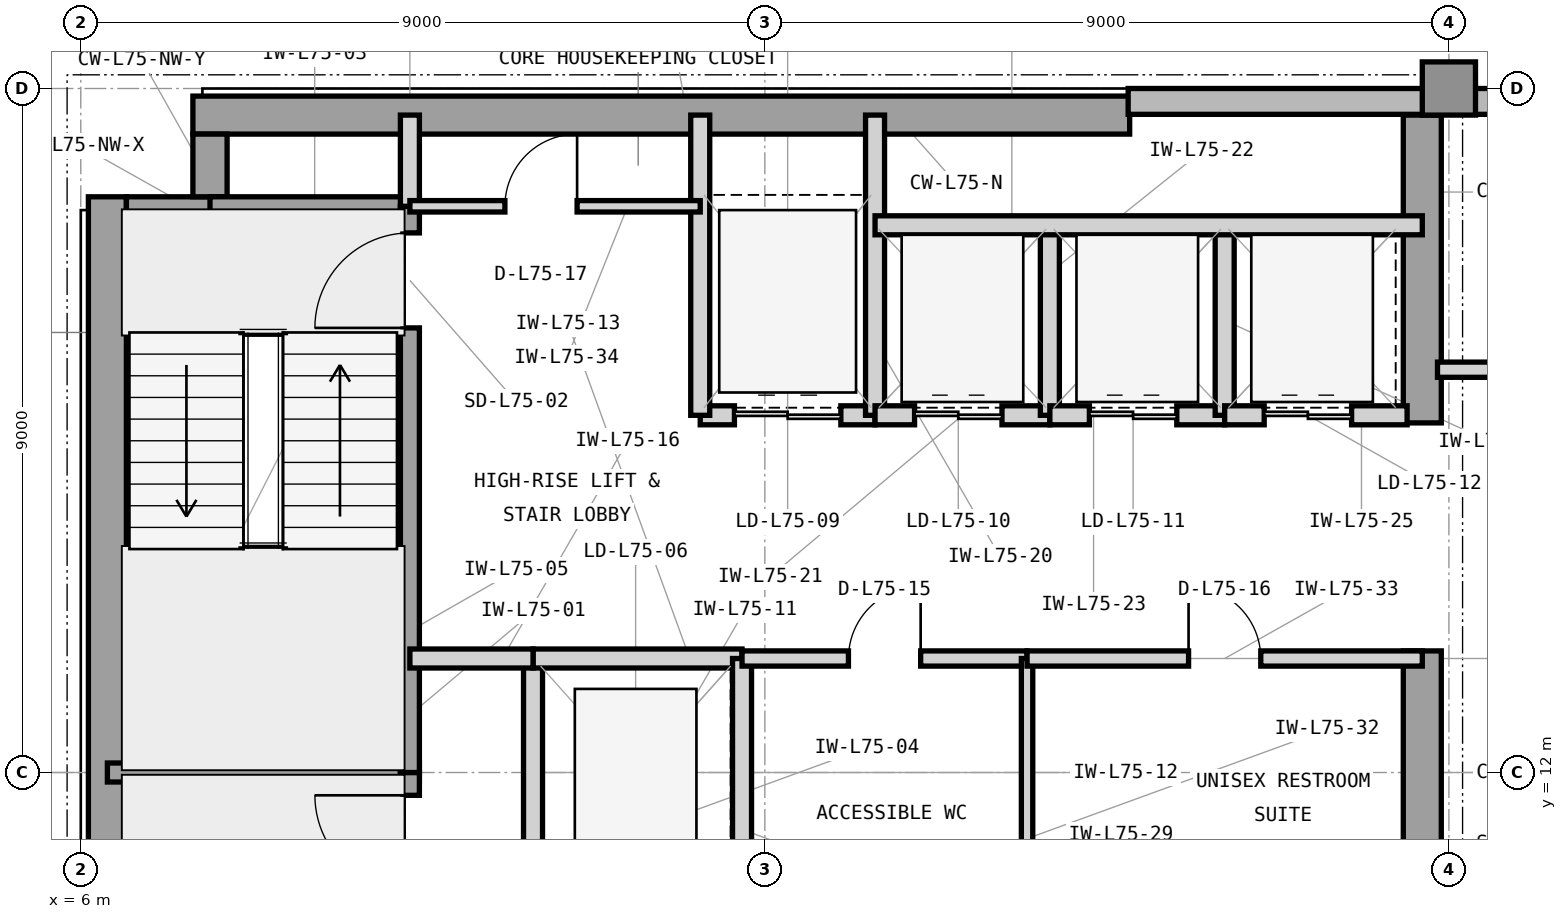
"""IFC4 building model, lengths in metres.
Left out: names, types, materials, properties, quantities, classifications, styles, units other than length and angle.
Written with IfcOpenShell. Run it as: python <this file> out.ifc"""

import sys

from ifc_helpers import new_model, si_unit, direction, frame, frame_2d, origin, origin_2d, place, context, subcontext, project, spatial, rectangle, extrude, element, fill, save


model = new_model("IFC4")
c1 = context("Model", 3, precision=1e-05, world=origin(), true_north=direction((0.0, 1.0)))
c2 = subcontext(c1, "Body", "Model", "MODEL_VIEW")
j1 = project(units=[si_unit("LENGTHUNIT", "METRE"), si_unit("PLANEANGLEUNIT", "RADIAN")], contexts=[c1])
p1 = place(None, origin())
s1 = spatial("IfcSite", under=j1, at=p1, CompositionType="ELEMENT")
p2 = place(p1, origin())
s2 = spatial("IfcBuilding", under=s1, at=p2, CompositionType="ELEMENT")
p3 = place(p2, frame((0.0, 0.0, 305.4)))
s3 = spatial("IfcBuildingStorey", under=s2, at=p3, CompositionType="ELEMENT", Elevation=305.4)
p4 = place(p3, frame((6.35, 4.425, 0.0), z_axis=(0.0, 0.0, 1.0), x_axis=(0.0, 1.0, 0.0)))
e1 = element("IfcWall", 1, at=p4, inside=s3, PredefinedType="SHEAR", context=c2, shape_type="SweptSolid", body=[
    extrude(rectangle(XDim=15.15, YDim=0.5, at=frame_2d((7.575, 0.0))), origin(), (0.0, 0.0, 1.0), 3.9),
])
p5 = place(p3, frame((7.475, 20.65, 0.0), z_axis=(0.0, 0.0, 1.0), x_axis=(1.0, 0.0, 0.0)))
e2 = element("IfcWall", 2, at=p5, inside=s3, PredefinedType="SHEAR", context=c2, shape_type="SweptSolid", body=[
    extrude(rectangle(XDim=12.325, YDim=0.5, at=frame_2d((6.163, 0.0))), origin(), (0.0, 0.0, 1.0), 3.9),
])
p6 = place(p3, frame((23.65, 10.4, 0.0), z_axis=(0.0, 0.0, 1.0), x_axis=(0.0, 1.0, 0.0)))
e3 = element("IfcWall", 3, at=p6, inside=s3, PredefinedType="SHEAR", context=c2, shape_type="SweptSolid", body=[
    extrude(rectangle(XDim=3.2, YDim=0.5, at=frame_2d((1.6, 0.0))), origin(), (0.0, 0.0, 1.0), 3.9),
])
p7 = place(p3, frame((23.65, 16.6, 0.0), z_axis=(0.0, 0.0, 1.0), x_axis=(0.0, 1.0, 0.0)))
e4 = element("IfcWall", 4, at=p7, inside=s3, PredefinedType="SHEAR", context=c2, shape_type="SweptSolid", body=[
    extrude(rectangle(XDim=4.05, YDim=0.5, at=frame_2d((2.025, 0.0))), origin(), (0.0, 0.0, 1.0), 3.9),
])
p8 = place(p3, frame((6.6, 19.35, 0.0), z_axis=(0.0, 0.0, 1.0), x_axis=(1.0, 0.0, 0.0)))
e5 = element("IfcWall", 5, at=p8, inside=s3, PredefinedType="SHEAR", context=c2, shape_type="SweptSolid", body=[
    extrude(rectangle(XDim=1.325, YDim=0.45, at=frame_2d((0.663, 0.0))), origin(), (0.0, 0.0, 1.0), 3.9),
])
p9 = place(p3, frame((7.7, 19.575, 0.0), z_axis=(0.0, 0.0, 1.0), x_axis=(0.0, 1.0, 0.0)))
e6 = element("IfcWall", 6, at=p9, inside=s3, PredefinedType="SHEAR", context=c2, shape_type="SweptSolid", body=[
    extrude(rectangle(XDim=0.825, YDim=0.45, at=frame_2d((0.413, 0.0))), origin(), (0.0, 0.0, 1.0), 3.9),
])
p10 = place(p3, frame((24.0, 21.0, 0.0), z_axis=(0.0, 0.0, 1.0), x_axis=(1.0, 0.0, 0.0)))
e7 = element("IfcColumn", 7, at=p10, inside=s3, PredefinedType="COLUMN", context=c2, shape_type="SweptSolid", body=[
    extrude(rectangle(XDim=0.7, YDim=0.7, at=origin_2d()), origin(), (0.0, 0.0, 1.0), 3.9),
])
p11 = place(p3, frame((49.4, 20.83, 0.0), z_axis=(0.0, 0.0, 1.0), x_axis=(-1.0, 0.0, 0.0)))
e8 = element("IfcWall", 8, at=p11, inside=s3, PredefinedType="STANDARD", context=c2, shape_type="SweptSolid", body=[
    extrude(rectangle(XDim=29.62, YDim=0.34, at=frame_2d((14.81, 0.0))), origin(), (0.0, 0.0, 1.0), 3.715),
])
p12 = place(p11, frame((11.042, 0.0, 0.8)))
e9 = element("IfcOpeningElement", 9, at=p12, cuts=e8, PredefinedType="OPENING", context=c2, shape_type="SweptSolid", body=[
    extrude(rectangle(XDim=2.6, YDim=2.35, at=frame_2d((1.3, 1.175))), frame((0.0, 0.18, 0.0), z_axis=(0.0, -1.0, 0.0), x_axis=(1.0, 0.0, 0.0)), (0.0, 0.0, 1.0), 0.36),
])
p13 = place(p11, frame((20.915, 0.0, 0.8)))
e10 = element("IfcOpeningElement", 10, at=p13, cuts=e8, PredefinedType="OPENING", context=c2, shape_type="SweptSolid", body=[
    extrude(rectangle(XDim=2.6, YDim=2.35, at=frame_2d((1.3, 1.175))), frame((0.0, 0.18, 0.0), z_axis=(0.0, -1.0, 0.0), x_axis=(1.0, 0.0, 0.0)), (0.0, 0.0, 1.0), 0.36),
])
p14 = place(p11, frame((7.925, 0.0, 0.8)))
e11 = element("IfcOpeningElement", 11, at=p14, cuts=e8, PredefinedType="OPENING", context=c2, shape_type="SweptSolid", body=[
    extrude(rectangle(XDim=1.9, YDim=2.35, at=frame_2d((0.95, 1.175))), frame((0.0, 0.18, 0.0), z_axis=(0.0, -1.0, 0.0), x_axis=(1.0, 0.0, 0.0)), (0.0, 0.0, 1.0), 0.36),
])
p15 = place(p3, frame((6.35, 12.0, 0.0), z_axis=(0.0, 0.0, 1.0), x_axis=(1.0, 0.0, 0.0)))
e12 = element("IfcWall", 12, at=p15, inside=s3, PredefinedType="SHEAR", context=c2, shape_type="SweptSolid", body=[
    extrude(rectangle(XDim=4.105, YDim=0.25, at=frame_2d((2.052, 0.0))), origin(), (0.0, 0.0, 1.0), 3.9),
])
p16 = place(p3, frame((7.7, 19.45, 0.0), z_axis=(0.0, 0.0, 1.0), x_axis=(1.0, 0.0, 0.0)))
e13 = element("IfcWall", 13, at=p16, inside=s3, PredefinedType="SHEAR", context=c2, shape_type="SweptSolid", body=[
    extrude(rectangle(XDim=2.755, YDim=0.25, at=frame_2d((1.377, 0.0))), origin(), (0.0, 0.0, 1.0), 3.9),
])
p17 = place(p3, frame((10.33, 4.55, 0.0), z_axis=(0.0, 0.0, 1.0), x_axis=(0.0, 1.0, 0.0)))
e14 = element("IfcWall", 14, at=p17, inside=s3, PredefinedType="SHEAR", context=c2, shape_type="SweptSolid", body=[
    extrude(rectangle(XDim=7.45, YDim=0.25, at=frame_2d((3.725, 0.0))), origin(), (0.0, 0.0, 1.0), 3.9),
])
p18 = place(p17, frame((5.9, 0.0, 0.0)))
e15 = element("IfcOpeningElement", 15, at=p18, cuts=e14, PredefinedType="OPENING", context=c2, shape_type="SweptSolid", body=[
    extrude(rectangle(XDim=1.25, YDim=2.2, at=frame_2d((0.625, 1.1))), frame((0.0, 0.135, 0.0), z_axis=(0.0, -1.0, 0.0), x_axis=(1.0, 0.0, 0.0)), (0.0, 0.0, 1.0), 0.27),
])
p19 = place(p3, frame((10.33, 12.0, 0.0), z_axis=(0.0, 0.0, 1.0), x_axis=(0.0, 1.0, 0.0)))
e16 = element("IfcWall", 16, at=p19, inside=s3, PredefinedType="SHEAR", context=c2, shape_type="SweptSolid", body=[
    extrude(rectangle(XDim=7.45, YDim=0.25, at=frame_2d((3.725, 0.0))), origin(), (0.0, 0.0, 1.0), 3.9),
])
p20 = place(p19, frame((5.85, 0.0, 0.0)))
e17 = element("IfcOpeningElement", 17, at=p20, cuts=e16, PredefinedType="OPENING", context=c2, shape_type="SweptSolid", body=[
    extrude(rectangle(XDim=1.25, YDim=2.2, at=frame_2d((0.625, 1.1))), frame((0.0, 0.135, 0.0), z_axis=(0.0, -1.0, 0.0), x_axis=(1.0, 0.0, 0.0)), (0.0, 0.0, 1.0), 0.27),
])
p21 = place(p3, frame((10.33, 19.45, 0.0), z_axis=(0.0, 0.0, 1.0), x_axis=(0.0, 1.0, 0.0)))
e18 = element("IfcWall", 18, at=p21, inside=s3, PredefinedType="PARTITIONING", context=c2, shape_type="SweptSolid", body=[
    extrude(rectangle(XDim=1.2, YDim=0.25, at=frame_2d((0.6, 0.0))), origin(), (0.0, 0.0, 1.0), 3.705),
])
p22 = place(p3, frame((11.95, 10.5, 0.0), z_axis=(0.0, 0.0, 1.0), x_axis=(0.0, 1.0, 0.0)))
e19 = element("IfcWall", 19, at=p22, inside=s3, PredefinedType="PARTITIONING", context=c2, shape_type="SweptSolid", body=[
    extrude(rectangle(XDim=3.0, YDim=0.25, at=frame_2d((1.5, 0.0))), origin(), (0.0, 0.0, 1.0), 3.705),
])
p23 = place(p3, frame((11.95, 13.5, 0.0), z_axis=(0.0, 0.0, 1.0), x_axis=(1.0, 0.0, 0.0)))
e20 = element("IfcWall", 20, at=p23, inside=s3, PredefinedType="PARTITIONING", context=c2, shape_type="SweptSolid", body=[
    extrude(rectangle(XDim=2.75, YDim=0.25, at=frame_2d((1.375, 0.0))), origin(), (0.0, 0.0, 1.0), 3.354),
])
p24 = place(p3, frame((14.7, 10.5, 0.0), z_axis=(0.0, 0.0, 1.0), x_axis=(0.0, 1.0, 0.0)))
e21 = element("IfcWall", 21, at=p24, inside=s3, PredefinedType="PARTITIONING", context=c2, shape_type="SweptSolid", body=[
    extrude(rectangle(XDim=3.0, YDim=0.25, at=frame_2d((1.5, 0.0))), origin(), (0.0, 0.0, 1.0), 3.705),
])
p25 = place(p3, frame((10.33, 13.5, 0.0), z_axis=(0.0, 0.0, 1.0), x_axis=(1.0, 0.0, 0.0)))
e22 = element("IfcWall", 22, at=p25, inside=s3, PredefinedType="PARTITIONING", context=c2, shape_type="SweptSolid", body=[
    extrude(rectangle(XDim=1.62, YDim=0.25, at=frame_2d((0.81, 0.0))), origin(), (0.0, 0.0, 1.0), 3.354),
])
p26 = place(p3, frame((14.15, 16.7, 0.0), z_axis=(0.0, 0.0, 1.0), x_axis=(1.0, 0.0, 0.0)))
e23 = element("IfcWall", 23, at=p26, inside=s3, PredefinedType="PARTITIONING", context=c2, shape_type="SweptSolid", body=[
    extrude(rectangle(XDim=2.3, YDim=0.25, at=frame_2d((1.15, 0.0))), origin(), (0.0, 0.0, 1.0), 3.354),
])
p27 = place(p26, frame((0.45, 0.0, 0.0)))
e24 = element("IfcOpeningElement", 24, at=p27, cuts=e23, PredefinedType="OPENING", context=c2, shape_type="SweptSolid", body=[
    extrude(rectangle(XDim=1.4, YDim=2.35, at=frame_2d((0.7, 1.175))), frame((0.0, 0.135, 0.0), z_axis=(0.0, -1.0, 0.0), x_axis=(1.0, 0.0, 0.0)), (0.0, 0.0, 1.0), 0.27),
])
for number, where, z_axis, x_axis in (
    (25, (14.15, 16.7, 0.0), (0.0, 0.0, 1.0), (0.0, 1.0, 0.0)),
    (26, (16.45, 16.7, 0.0), (0.0, 0.0, 1.0), (0.0, 1.0, 0.0)),
):
    element("IfcWall", number, at=place(p3, frame(where, z_axis=z_axis, x_axis=x_axis)), inside=s3, PredefinedType="PARTITIONING", context=c2, shape_type="SweptSolid", body=[
        extrude(rectangle(XDim=3.95, YDim=0.25, at=frame_2d((1.975, 0.0))), origin(), (0.0, 0.0, 1.0), 3.705),
    ])
p28 = place(p3, frame((16.45, 16.7, 0.0), z_axis=(0.0, 0.0, 1.0), x_axis=(1.0, 0.0, 0.0)))
e27 = element("IfcWall", 27, at=p28, inside=s3, PredefinedType="PARTITIONING", context=c2, shape_type="SweptSolid", body=[
    extrude(rectangle(XDim=2.3, YDim=0.25, at=frame_2d((1.15, 0.0))), origin(), (0.0, 0.0, 1.0), 3.354),
])
p29 = place(p28, frame((0.52, 0.0, 0.0)))
e28 = element("IfcOpeningElement", 28, at=p29, cuts=e27, PredefinedType="OPENING", context=c2, shape_type="SweptSolid", body=[
    extrude(rectangle(XDim=1.15, YDim=2.25, at=frame_2d((0.575, 1.125))), frame((0.0, 0.135, 0.0), z_axis=(0.0, -1.0, 0.0), x_axis=(1.0, 0.0, 0.0)), (0.0, 0.0, 1.0), 0.27),
])
p30 = place(p3, frame((18.75, 16.7, 0.0), z_axis=(0.0, 0.0, 1.0), x_axis=(0.0, 1.0, 0.0)))
e29 = element("IfcWall", 29, at=p30, inside=s3, PredefinedType="PARTITIONING", context=c2, shape_type="SweptSolid", body=[
    extrude(rectangle(XDim=2.5, YDim=0.25, at=frame_2d((1.25, 0.0))), origin(), (0.0, 0.0, 1.0), 3.705),
])
p31 = place(p3, frame((18.75, 16.7, 0.0), z_axis=(0.0, 0.0, 1.0), x_axis=(1.0, 0.0, 0.0)))
e30 = element("IfcWall", 30, at=p31, inside=s3, PredefinedType="PARTITIONING", context=c2, shape_type="SweptSolid", body=[
    extrude(rectangle(XDim=2.3, YDim=0.25, at=frame_2d((1.15, 0.0))), origin(), (0.0, 0.0, 1.0), 3.354),
])
p32 = place(p31, frame((0.52, 0.0, 0.0)))
e31 = element("IfcOpeningElement", 31, at=p32, cuts=e30, PredefinedType="OPENING", context=c2, shape_type="SweptSolid", body=[
    extrude(rectangle(XDim=1.15, YDim=2.25, at=frame_2d((0.575, 1.125))), frame((0.0, 0.135, 0.0), z_axis=(0.0, -1.0, 0.0), x_axis=(1.0, 0.0, 0.0)), (0.0, 0.0, 1.0), 0.27),
])
p33 = place(p3, frame((21.05, 16.7, 0.0), z_axis=(0.0, 0.0, 1.0), x_axis=(0.0, 1.0, 0.0)))
e32 = element("IfcWall", 32, at=p33, inside=s3, PredefinedType="PARTITIONING", context=c2, shape_type="SweptSolid", body=[
    extrude(rectangle(XDim=2.5, YDim=0.25, at=frame_2d((1.25, 0.0))), origin(), (0.0, 0.0, 1.0), 3.705),
])
p34 = place(p3, frame((21.05, 16.7, 0.0), z_axis=(0.0, 0.0, 1.0), x_axis=(1.0, 0.0, 0.0)))
e33 = element("IfcWall", 33, at=p34, inside=s3, PredefinedType="PARTITIONING", context=c2, shape_type="SweptSolid", body=[
    extrude(rectangle(XDim=2.4, YDim=0.25, at=frame_2d((1.2, 0.0))), origin(), (0.0, 0.0, 1.0), 3.354),
])
p35 = place(p34, frame((0.52, 0.0, 0.0)))
e34 = element("IfcOpeningElement", 34, at=p35, cuts=e33, PredefinedType="OPENING", context=c2, shape_type="SweptSolid", body=[
    extrude(rectangle(XDim=1.15, YDim=2.25, at=frame_2d((0.575, 1.125))), frame((0.0, 0.135, 0.0), z_axis=(0.0, -1.0, 0.0), x_axis=(1.0, 0.0, 0.0)), (0.0, 0.0, 1.0), 0.27),
])
p36 = place(p3, frame((16.45, 19.2, 0.0), z_axis=(0.0, 0.0, 1.0), x_axis=(1.0, 0.0, 0.0)))
e35 = element("IfcWall", 35, at=p36, inside=s3, PredefinedType="PARTITIONING", context=c2, shape_type="SweptSolid", body=[
    extrude(rectangle(XDim=7.2, YDim=0.25, at=frame_2d((3.6, 0.0))), origin(), (0.0, 0.0, 1.0), 3.705),
])
p37 = place(p3, frame((14.7, 13.5, 0.0), z_axis=(0.0, 0.0, 1.0), x_axis=(1.0, 0.0, 0.0)))
e36 = element("IfcWall", 36, at=p37, inside=s3, PredefinedType="PARTITIONING", context=c2, shape_type="SweptSolid", body=[
    extrude(rectangle(XDim=3.75, YDim=0.2, at=frame_2d((1.875, 0.0))), origin(), (0.0, 0.0, 1.0), 3.354),
])
p38 = place(p37, frame((1.4, 0.0, 0.0)))
e37 = element("IfcOpeningElement", 37, at=p38, cuts=e36, PredefinedType="OPENING", context=c2, shape_type="SweptSolid", body=[
    extrude(rectangle(XDim=0.95, YDim=2.1, at=frame_2d((0.475, 1.05))), frame((0.0, 0.11, 0.0), z_axis=(0.0, -1.0, 0.0), x_axis=(1.0, 0.0, 0.0)), (0.0, 0.0, 1.0), 0.22),
])
p39 = place(p3, frame((18.45, 10.34, 0.0), z_axis=(0.0, 0.0, 1.0), x_axis=(0.0, 1.0, 0.0)))
e38 = element("IfcWall", 38, at=p39, inside=s3, PredefinedType="PARTITIONING", context=c2, shape_type="SweptSolid", body=[
    extrude(rectangle(XDim=3.16, YDim=0.15, at=frame_2d((1.58, 0.0))), origin(), (0.0, 0.0, 1.0), 3.705),
])
p40 = place(p3, frame((18.45, 13.5, 0.0), z_axis=(0.0, 0.0, 1.0), x_axis=(1.0, 0.0, 0.0)))
e39 = element("IfcWall", 39, at=p40, inside=s3, PredefinedType="PARTITIONING", context=c2, shape_type="SweptSolid", body=[
    extrude(rectangle(XDim=5.2, YDim=0.2, at=frame_2d((2.6, 0.0))), origin(), (0.0, 0.0, 1.0), 3.354),
])
p41 = place(p40, frame((2.125, 0.0, 0.0)))
e40 = element("IfcOpeningElement", 40, at=p41, cuts=e39, PredefinedType="OPENING", context=c2, shape_type="SweptSolid", body=[
    extrude(rectangle(XDim=0.95, YDim=2.1, at=frame_2d((0.475, 1.05))), frame((0.0, 0.11, 0.0), z_axis=(0.0, -1.0, 0.0), x_axis=(1.0, 0.0, 0.0)), (0.0, 0.0, 1.0), 0.22),
])
p42 = place(p3, frame((10.33, 19.45, 0.0), z_axis=(0.0, 0.0, 1.0), x_axis=(1.0, 0.0, 0.0)))
e41 = element("IfcWall", 41, at=p42, inside=s3, PredefinedType="PARTITIONING", context=c2, shape_type="SweptSolid", body=[
    extrude(rectangle(XDim=3.82, YDim=0.15, at=frame_2d((1.91, 0.0))), origin(), (0.0, 0.0, 1.0), 3.705),
])
p43 = place(p42, frame((1.25, 0.0, 0.0)))
e42 = element("IfcOpeningElement", 42, at=p43, cuts=e41, PredefinedType="OPENING", context=c2, shape_type="SweptSolid", body=[
    extrude(rectangle(XDim=0.95, YDim=2.1, at=frame_2d((0.475, 1.05))), frame((0.0, 0.085, 0.0), z_axis=(0.0, -1.0, 0.0), x_axis=(1.0, 0.0, 0.0)), (0.0, 0.0, 1.0), 0.17),
])
p44 = place(p3, frame((23.85, 17.3, 0.0), z_axis=(0.0, 0.0, 1.0), x_axis=(1.0, 0.0, 0.0)))
e43 = element("IfcWall", 43, at=p44, inside=s3, PredefinedType="PARTITIONING", context=c2, shape_type="SweptSolid", body=[
    extrude(rectangle(XDim=7.35, YDim=0.2, at=frame_2d((3.675, 0.0))), origin(), (0.0, 0.0, 1.0), 3.705),
])
p45 = place(p44, frame((2.8, 0.0, 0.0)))
e44 = element("IfcOpeningElement", 44, at=p45, cuts=e43, PredefinedType="OPENING", context=c2, shape_type="SweptSolid", body=[
    extrude(rectangle(XDim=1.0, YDim=2.15, at=frame_2d((0.5, 1.075))), frame((0.0, 0.11, 0.0), z_axis=(0.0, -1.0, 0.0), x_axis=(1.0, 0.0, 0.0)), (0.0, 0.0, 1.0), 0.22),
])
p46 = place(p18, origin())
e45 = element("IfcDoor", 45, at=p46, inside=s3, OperationType="SINGLE_SWING_RIGHT", PredefinedType="DOOR", context=c2, shape_type="SweptSolid", body=[
    extrude(rectangle(XDim=1.25, YDim=2.2, at=frame_2d((0.625, 1.1))), frame((0.0, 0.025, 0.0), z_axis=(0.0, -1.0, 0.0), x_axis=(1.0, 0.0, 0.0)), (0.0, 0.0, 1.0), 0.05),
])
fill(e15, e45)
p47 = place(p20, origin())
e46 = element("IfcDoor", 46, at=p47, inside=s3, OperationType="SINGLE_SWING_LEFT", PredefinedType="DOOR", context=c2, shape_type="SweptSolid", body=[
    extrude(rectangle(XDim=1.25, YDim=2.2, at=frame_2d((0.625, 1.1))), frame((0.0, 0.025, 0.0), z_axis=(0.0, -1.0, 0.0), x_axis=(1.0, 0.0, 0.0)), (0.0, 0.0, 1.0), 0.05),
])
fill(e17, e46)
p48 = place(p27, origin())
e47 = element("IfcDoor", 47, at=p48, inside=s3, OperationType="DOUBLE_DOOR_SLIDING", PredefinedType="DOOR", context=c2, shape_type="SweptSolid", body=[
    extrude(rectangle(XDim=1.4, YDim=2.35, at=frame_2d((0.7, 1.175))), frame((0.0, 0.025, 0.0), z_axis=(0.0, -1.0, 0.0), x_axis=(1.0, 0.0, 0.0)), (0.0, 0.0, 1.0), 0.05),
])
fill(e24, e47)
p49 = place(p29, origin())
e48 = element("IfcDoor", 48, at=p49, inside=s3, OperationType="DOUBLE_DOOR_SLIDING", PredefinedType="DOOR", context=c2, shape_type="SweptSolid", body=[
    extrude(rectangle(XDim=1.15, YDim=2.25, at=frame_2d((0.575, 1.125))), frame((0.0, 0.025, 0.0), z_axis=(0.0, -1.0, 0.0), x_axis=(1.0, 0.0, 0.0)), (0.0, 0.0, 1.0), 0.05),
])
fill(e28, e48)
p50 = place(p32, origin())
e49 = element("IfcDoor", 49, at=p50, inside=s3, OperationType="DOUBLE_DOOR_SLIDING", PredefinedType="DOOR", context=c2, shape_type="SweptSolid", body=[
    extrude(rectangle(XDim=1.15, YDim=2.25, at=frame_2d((0.575, 1.125))), frame((0.0, 0.025, 0.0), z_axis=(0.0, -1.0, 0.0), x_axis=(1.0, 0.0, 0.0)), (0.0, 0.0, 1.0), 0.05),
])
fill(e31, e49)
p51 = place(p35, origin())
e50 = element("IfcDoor", 50, at=p51, inside=s3, OperationType="DOUBLE_DOOR_SLIDING", PredefinedType="DOOR", context=c2, shape_type="SweptSolid", body=[
    extrude(rectangle(XDim=1.15, YDim=2.25, at=frame_2d((0.575, 1.125))), frame((0.0, 0.025, 0.0), z_axis=(0.0, -1.0, 0.0), x_axis=(1.0, 0.0, 0.0)), (0.0, 0.0, 1.0), 0.05),
])
fill(e34, e50)
p52 = place(p38, origin())
e51 = element("IfcDoor", 51, at=p52, inside=s3, OperationType="SINGLE_SWING_RIGHT", PredefinedType="DOOR", context=c2, shape_type="SweptSolid", body=[
    extrude(rectangle(XDim=0.95, YDim=2.1, at=frame_2d((0.475, 1.05))), frame((0.0, 0.025, 0.0), z_axis=(0.0, -1.0, 0.0), x_axis=(1.0, 0.0, 0.0)), (0.0, 0.0, 1.0), 0.05),
])
fill(e37, e51)
p53 = place(p41, origin())
e52 = element("IfcDoor", 52, at=p53, inside=s3, OperationType="SINGLE_SWING_LEFT", PredefinedType="DOOR", context=c2, shape_type="SweptSolid", body=[
    extrude(rectangle(XDim=0.95, YDim=2.1, at=frame_2d((0.475, 1.05))), frame((0.0, 0.025, 0.0), z_axis=(0.0, -1.0, 0.0), x_axis=(1.0, 0.0, 0.0)), (0.0, 0.0, 1.0), 0.05),
])
fill(e40, e52)
p54 = place(p43, origin())
e53 = element("IfcDoor", 53, at=p54, inside=s3, OperationType="SINGLE_SWING_RIGHT", PredefinedType="DOOR", context=c2, shape_type="SweptSolid", body=[
    extrude(rectangle(XDim=0.95, YDim=2.1, at=frame_2d((0.475, 1.05))), frame((0.0, 0.025, 0.0), z_axis=(0.0, -1.0, 0.0), x_axis=(1.0, 0.0, 0.0)), (0.0, 0.0, 1.0), 0.05),
])
fill(e42, e53)
save(model, sys.argv[1])
